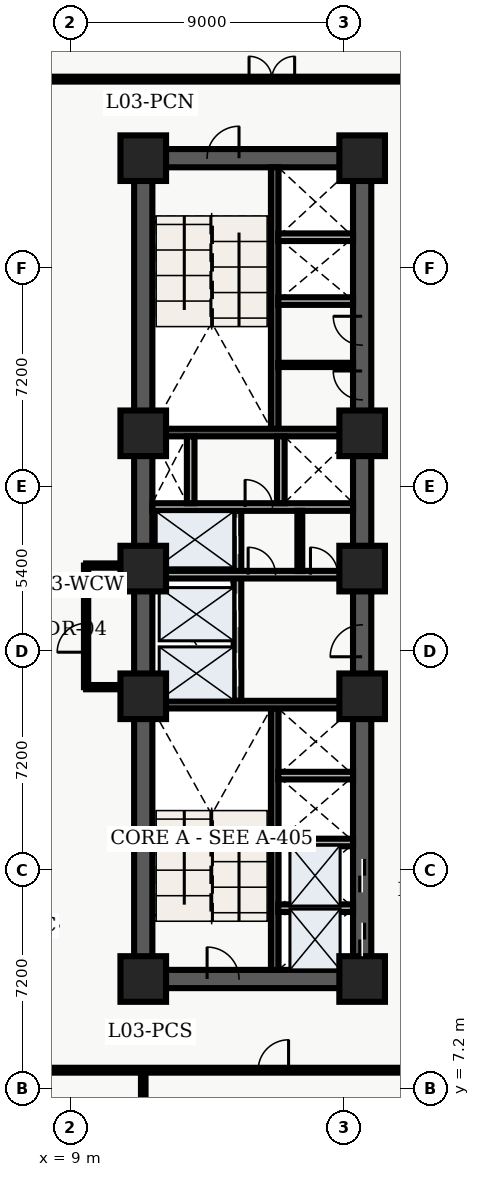
"""IFC4 building model, lengths in metres.
Left out: names, types, materials, properties, quantities, classifications, styles, units other than length and angle.
Written with IfcOpenShell. Run it as: python <this file> out.ifc"""

import sys

from ifc_helpers import new_model, entity, si_unit, converted_unit, direction, frame, origin_with_axes, origin_2d_with_axis, place, context, subcontext, project, spatial, polyline, rectangle, outline, extrude, element, fill, save


model = new_model("IFC4")
c1 = context("Model", 3, precision=1e-05, world=origin_with_axes(), true_north=direction((0.0, 1.0)))
c2 = subcontext(c1, "Body", "Model", "MODEL_VIEW")
j1 = project(units=[si_unit("LENGTHUNIT", "METRE"), converted_unit("PLANEANGLEUNIT", "DEGREE", entity("IfcPlaneAngleMeasure", 0.017), si_unit("PLANEANGLEUNIT", "RADIAN"), dimensions=[0, 0, 0, 0, 0, 0, 0])], contexts=[c1])
p1 = place(None, origin_with_axes())
s1 = spatial("IfcSite", under=j1, at=p1, CompositionType="ELEMENT")
p2 = place(p1, origin_with_axes())
s2 = spatial("IfcBuilding", under=s1, at=p2, CompositionType="ELEMENT")
p3 = place(p2, frame((0.0, 0.0, 15.3), z_axis=(0.0, 0.0, 1.0), x_axis=(1.0, 0.0, 0.0)))
s3 = spatial("IfcBuildingStorey", under=s2, at=p3, CompositionType="ELEMENT", Elevation=15.3)
p4 = place(p3, frame((11.4, 10.8, 0.0), z_axis=(0.0, 0.0, 1.0), x_axis=(0.0, 1.0, 0.0)))
e1 = element("IfcWall", 1, at=p4, inside=s3, PredefinedType="SHEAR", context=c2, shape_type="SweptSolid", body=[
    extrude(outline(polyline([(0.0, -0.3), (27.0, -0.3), (27.0, 0.3), (0.0, 0.3), (0.0, -0.3)])), origin_with_axes(), (0.0, 0.0, 1.0), 4.26),
])
p5 = place(p3, frame((11.4, 10.8, 0.0), z_axis=(0.0, 0.0, 1.0), x_axis=(1.0, 0.0, 0.0)))
e2 = element("IfcWall", 2, at=p5, inside=s3, PredefinedType="SHEAR", context=c2, shape_type="SweptSolid", body=[
    extrude(outline(polyline([(0.0, -0.3), (7.2, -0.3), (7.2, 0.3), (0.0, 0.3), (0.0, -0.3)])), origin_with_axes(), (0.0, 0.0, 1.0), 4.26),
])
p6 = place(p5, frame((2.625, 0.0, 0.0), z_axis=(0.0, 0.0, 1.0), x_axis=(1.0, 0.0, 0.0)))
e3 = element("IfcOpeningElement", 3, at=p6, cuts=e2, PredefinedType="OPENING", context=c2, shape_type="SweptSolid", body=[
    extrude(rectangle(XDim=1.05, YDim=0.62, at=origin_2d_with_axis()), origin_with_axes(), (0.0, 0.0, 1.0), 2.15),
])
p7 = place(p3, frame((11.4, 37.8, 0.0), z_axis=(0.0, 0.0, 1.0), x_axis=(1.0, 0.0, 0.0)))
e4 = element("IfcWall", 4, at=p7, inside=s3, PredefinedType="SHEAR", context=c2, shape_type="SweptSolid", body=[
    extrude(outline(polyline([(0.0, -0.3), (7.2, -0.3), (7.2, 0.3), (0.0, 0.3), (0.0, -0.3)])), origin_with_axes(), (0.0, 0.0, 1.0), 4.26),
])
p8 = place(p7, frame((2.625, 0.0, 0.0), z_axis=(0.0, 0.0, 1.0), x_axis=(1.0, 0.0, 0.0)))
e5 = element("IfcOpeningElement", 5, at=p8, cuts=e4, PredefinedType="OPENING", context=c2, shape_type="SweptSolid", body=[
    extrude(rectangle(XDim=1.05, YDim=0.62, at=origin_2d_with_axis()), origin_with_axes(), (0.0, 0.0, 1.0), 2.15),
])
p9 = place(p3, frame((18.6, 10.8, 0.0), z_axis=(0.0, 0.0, 1.0), x_axis=(0.0, 1.0, 0.0)))
e6 = element("IfcWall", 6, at=p9, inside=s3, PredefinedType="SHEAR", context=c2, shape_type="SweptSolid", body=[
    extrude(outline(polyline([(0.0, -0.3), (13.5, -0.3), (13.5, 0.3), (0.0, 0.3), (0.0, -0.3)])), origin_with_axes(), (0.0, 0.0, 1.0), 4.26),
])
p10 = place(p9, frame((1.3, 0.0, 0.0), z_axis=(0.0, 0.0, 1.0), x_axis=(1.0, 0.0, 0.0)))
e7 = element("IfcOpeningElement", 7, at=p10, cuts=e6, PredefinedType="OPENING", context=c2, shape_type="SweptSolid", body=[
    extrude(rectangle(XDim=1.1, YDim=0.62, at=origin_2d_with_axis()), origin_with_axes(), (0.0, 0.0, 1.0), 2.15),
])
p11 = place(p9, frame((3.4, 0.0, 0.0), z_axis=(0.0, 0.0, 1.0), x_axis=(1.0, 0.0, 0.0)))
e8 = element("IfcOpeningElement", 8, at=p11, cuts=e6, PredefinedType="OPENING", context=c2, shape_type="SweptSolid", body=[
    extrude(rectangle(XDim=1.1, YDim=0.62, at=origin_2d_with_axis()), origin_with_axes(), (0.0, 0.0, 1.0), 2.15),
])
p12 = place(p9, frame((11.125, 0.0, 0.0), z_axis=(0.0, 0.0, 1.0), x_axis=(1.0, 0.0, 0.0)))
e9 = element("IfcOpeningElement", 9, at=p12, cuts=e6, PredefinedType="OPENING", context=c2, shape_type="SweptSolid", body=[
    extrude(rectangle(XDim=1.05, YDim=0.62, at=origin_2d_with_axis()), origin_with_axes(), (0.0, 0.0, 1.0), 2.15),
])
p13 = place(p3, frame((18.6, 24.3, 0.0), z_axis=(0.0, 0.0, 1.0), x_axis=(0.0, 1.0, 0.0)))
e10 = element("IfcWall", 10, at=p13, inside=s3, PredefinedType="SHEAR", context=c2, shape_type="SweptSolid", body=[
    extrude(outline(polyline([(0.0, -0.3), (13.5, -0.3), (13.5, 0.3), (0.0, 0.3), (0.0, -0.3)])), origin_with_axes(), (0.0, 0.0, 1.0), 4.26),
])
p14 = place(p13, frame((6.025, 0.0, 0.0), z_axis=(0.0, 0.0, 1.0), x_axis=(1.0, 0.0, 0.0)))
e11 = element("IfcOpeningElement", 11, at=p14, cuts=e10, PredefinedType="OPENING", context=c2, shape_type="SweptSolid", body=[
    extrude(rectangle(XDim=0.95, YDim=0.62, at=origin_2d_with_axis()), origin_with_axes(), (0.0, 0.0, 1.0), 2.15),
])
p15 = place(p13, frame((7.825, 0.0, 0.0), z_axis=(0.0, 0.0, 1.0), x_axis=(1.0, 0.0, 0.0)))
e12 = element("IfcOpeningElement", 12, at=p15, cuts=e10, PredefinedType="OPENING", context=c2, shape_type="SweptSolid", body=[
    extrude(rectangle(XDim=0.95, YDim=0.62, at=origin_2d_with_axis()), origin_with_axes(), (0.0, 0.0, 1.0), 2.15),
])
p16 = place(p3, frame((15.725, 11.1, 0.0), z_axis=(0.0, 0.0, 1.0), x_axis=(0.0, 1.0, 0.0)))
e13 = element("IfcWall", 13, at=p16, inside=s3, PredefinedType="SHEAR", context=c2, shape_type="SweptSolid", body=[
    extrude(outline(polyline([(0.0, -0.125), (8.6, -0.125), (8.6, 0.125), (0.0, 0.125), (0.0, -0.125)])), origin_with_axes(), (0.0, 0.0, 1.0), 4.26),
])
p17 = place(p3, frame((11.7, 19.825, 0.0), z_axis=(0.0, 0.0, 1.0), x_axis=(1.0, 0.0, 0.0)))
e14 = element("IfcWall", 14, at=p17, inside=s3, PredefinedType="SHEAR", context=c2, shape_type="SweptSolid", body=[
    extrude(outline(polyline([(0.0, -0.125), (6.6, -0.125), (6.6, 0.125), (0.0, 0.125), (0.0, -0.125)])), origin_with_axes(), (0.0, 0.0, 1.0), 4.26),
])
p18 = place(p3, frame((15.725, 28.9, 0.0), z_axis=(0.0, 0.0, 1.0), x_axis=(0.0, 1.0, 0.0)))
e15 = element("IfcWall", 15, at=p18, inside=s3, PredefinedType="SHEAR", context=c2, shape_type="SweptSolid", body=[
    extrude(outline(polyline([(0.0, -0.125), (8.6, -0.125), (8.6, 0.125), (0.0, 0.125), (0.0, -0.125)])), origin_with_axes(), (0.0, 0.0, 1.0), 4.26),
])
p19 = place(p3, frame((11.7, 28.775, 0.0), z_axis=(0.0, 0.0, 1.0), x_axis=(1.0, 0.0, 0.0)))
e16 = element("IfcWall", 16, at=p19, inside=s3, PredefinedType="SHEAR", context=c2, shape_type="SweptSolid", body=[
    extrude(outline(polyline([(0.0, -0.125), (6.6, -0.125), (6.6, 0.125), (0.0, 0.125), (0.0, -0.125)])), origin_with_axes(), (0.0, 0.0, 1.0), 4.26),
])
p20 = place(p3, frame((14.5, 19.95, 0.0), z_axis=(0.0, 0.0, 1.0), x_axis=(0.0, 1.0, 0.0)))
e17 = element("IfcWall", 17, at=p20, inside=s3, PredefinedType="SOLIDWALL", context=c2, shape_type="SweptSolid", body=[
    extrude(outline(polyline([(0.0, -0.125), (6.25, -0.125), (6.25, 0.125), (0.0, 0.125), (0.0, -0.125)])), origin_with_axes(), (0.0, 0.0, 1.0), 3.3),
])
p21 = place(p20, frame((1.025, 0.0, 0.0), z_axis=(0.0, 0.0, 1.0), x_axis=(1.0, 0.0, 0.0)))
e18 = element("IfcOpeningElement", 18, at=p21, cuts=e17, PredefinedType="OPENING", context=c2, shape_type="SweptSolid", body=[
    extrude(rectangle(XDim=1.1, YDim=0.27, at=origin_2d_with_axis()), origin_with_axes(), (0.0, 0.0, 1.0), 2.15),
])
p22 = place(p20, frame((2.975, 0.0, 0.0), z_axis=(0.0, 0.0, 1.0), x_axis=(1.0, 0.0, 0.0)))
e19 = element("IfcOpeningElement", 19, at=p22, cuts=e17, PredefinedType="OPENING", context=c2, shape_type="SweptSolid", body=[
    extrude(rectangle(XDim=1.1, YDim=0.27, at=origin_2d_with_axis()), origin_with_axes(), (0.0, 0.0, 1.0), 2.15),
])
p23 = place(p20, frame((5.425, 0.0, 0.0), z_axis=(0.0, 0.0, 1.0), x_axis=(1.0, 0.0, 0.0)))
e20 = element("IfcOpeningElement", 20, at=p23, cuts=e17, PredefinedType="OPENING", context=c2, shape_type="SweptSolid", body=[
    extrude(rectangle(XDim=1.2, YDim=0.27, at=origin_2d_with_axis()), origin_with_axes(), (0.0, 0.0, 1.0), 2.15),
])
p24 = place(p3, frame((11.7, 24.1, 0.0), z_axis=(0.0, 0.0, 1.0), x_axis=(1.0, 0.0, 0.0)))
e21 = element("IfcWall", 21, at=p24, inside=s3, PredefinedType="SOLIDWALL", context=c2, shape_type="SweptSolid", body=[
    extrude(outline(polyline([(0.0, -0.125), (6.6, -0.125), (6.6, 0.125), (0.0, 0.125), (0.0, -0.125)])), origin_with_axes(), (0.0, 0.0, 1.0), 3.3),
])
p25 = place(p24, frame((3.6, 0.0, 0.0), z_axis=(0.0, 0.0, 1.0), x_axis=(1.0, 0.0, 0.0)))
e22 = element("IfcOpeningElement", 22, at=p25, cuts=e21, PredefinedType="OPENING", context=c2, shape_type="SweptSolid", body=[
    extrude(rectangle(XDim=0.9, YDim=0.27, at=origin_2d_with_axis()), origin_with_axes(), (0.0, 0.0, 1.0), 2.15),
])
p26 = place(p24, frame((5.65, 0.0, 0.0), z_axis=(0.0, 0.0, 1.0), x_axis=(1.0, 0.0, 0.0)))
e23 = element("IfcOpeningElement", 23, at=p26, cuts=e21, PredefinedType="OPENING", context=c2, shape_type="SweptSolid", body=[
    extrude(rectangle(XDim=0.9, YDim=0.27, at=origin_2d_with_axis()), origin_with_axes(), (0.0, 0.0, 1.0), 2.15),
])
p27 = place(p3, frame((11.7, 26.325, 0.0), z_axis=(0.0, 0.0, 1.0), x_axis=(1.0, 0.0, 0.0)))
e24 = element("IfcWall", 24, at=p27, inside=s3, PredefinedType="SOLIDWALL", context=c2, shape_type="SweptSolid", body=[
    extrude(outline(polyline([(0.0, -0.125), (6.6, -0.125), (6.6, 0.125), (0.0, 0.125), (0.0, -0.125)])), origin_with_axes(), (0.0, 0.0, 1.0), 3.3),
])
p28 = place(p27, frame((3.5, 0.0, 0.0), z_axis=(0.0, 0.0, 1.0), x_axis=(1.0, 0.0, 0.0)))
e25 = element("IfcOpeningElement", 25, at=p28, cuts=e24, PredefinedType="OPENING", context=c2, shape_type="SweptSolid", body=[
    extrude(rectangle(XDim=0.9, YDim=0.27, at=origin_2d_with_axis()), origin_with_axes(), (0.0, 0.0, 1.0), 2.15),
])
for number, where, z_axis, x_axis in (
    (26, (12.96, 26.45, 0.0), (0.0, 0.0, 1.0), (0.0, 1.0, 0.0)),
    (27, (15.925, 26.45, 0.0), (0.0, 0.0, 1.0), (0.0, 1.0, 0.0)),
):
    element("IfcWall", number, at=place(p3, frame(where, z_axis=z_axis, x_axis=x_axis)), inside=s3, PredefinedType="SOLIDWALL", context=c2, shape_type="SweptSolid", body=[
        extrude(outline(polyline([(0.0, -0.125), (2.2, -0.125), (2.2, 0.125), (0.0, 0.125), (0.0, -0.125)])), origin_with_axes(), (0.0, 0.0, 1.0), 3.3),
    ])
for number, where, z_axis, x_axis in (
    (28, (11.4, 10.8, 0.0), (0.0, 0.0, 1.0), (1.0, 0.0, 0.0)),
    (29, (11.4, 20.1, 0.0), (0.0, 0.0, 1.0), (1.0, 0.0, 0.0)),
    (30, (11.4, 24.3, 0.0), (0.0, 0.0, 1.0), (1.0, 0.0, 0.0)),
    (31, (11.4, 28.75, 0.0), (0.0, 0.0, 1.0), (1.0, 0.0, 0.0)),
    (32, (11.4, 37.8, 0.0), (0.0, 0.0, 1.0), (1.0, 0.0, 0.0)),
    (33, (18.6, 10.8, 0.0), (0.0, 0.0, 1.0), (1.0, 0.0, 0.0)),
    (34, (18.6, 20.1, 0.0), (0.0, 0.0, 1.0), (1.0, 0.0, 0.0)),
    (35, (18.6, 24.3, 0.0), (0.0, 0.0, 1.0), (1.0, 0.0, 0.0)),
    (36, (18.6, 28.75, 0.0), (0.0, 0.0, 1.0), (1.0, 0.0, 0.0)),
    (37, (18.6, 37.8, 0.0), (0.0, 0.0, 1.0), (1.0, 0.0, 0.0)),
):
    element("IfcColumn", number, at=place(p3, frame(where, z_axis=z_axis, x_axis=x_axis)), inside=s3, PredefinedType="COLUMN", context=c2, shape_type="SweptSolid", body=[
        extrude(rectangle(XDim=1.5, YDim=1.5, at=origin_2d_with_axis()), origin_with_axes(), (0.0, 0.0, 1.0), 4.5),
    ])
p29 = place(p3, frame((16.55, 24.22, 0.0), z_axis=(0.0, 0.0, 1.0), x_axis=(0.0, 1.0, 0.0)))
e38 = element("IfcWall", 38, at=p29, inside=s3, PredefinedType="PARTITIONING", context=c2, shape_type="SweptSolid", body=[
    extrude(outline(polyline([(0.0, -0.08), (1.98, -0.08), (1.98, 0.08), (0.0, 0.08), (0.0, -0.08)])), origin_with_axes(), (0.0, 0.0, 1.0), 3.2),
])
for number, where, z_axis, x_axis in (
    (39, (15.84, 13.13, 0.0), (0.0, 0.0, 1.0), (1.0, 0.0, 0.0)),
    (40, (15.84, 15.29, 0.0), (0.0, 0.0, 1.0), (1.0, 0.0, 0.0)),
    (41, (15.84, 17.49, 0.0), (0.0, 0.0, 1.0), (1.0, 0.0, 0.0)),
    (42, (15.84, 33.1, 0.0), (0.0, 0.0, 1.0), (1.0, 0.0, 0.0)),
    (43, (15.84, 35.2, 0.0), (0.0, 0.0, 1.0), (1.0, 0.0, 0.0)),
):
    element("IfcWall", number, at=place(p3, frame(where, z_axis=z_axis, x_axis=x_axis)), inside=s3, PredefinedType="SOLIDWALL", context=c2, shape_type="SweptSolid", body=[
        extrude(outline(polyline([(0.0, -0.125), (2.46, -0.125), (2.46, 0.125), (0.0, 0.125), (0.0, -0.125)])), origin_with_axes(), (0.0, 0.0, 1.0), 3.2),
    ])
p30 = place(p3, frame((15.84, 31.0, 0.0), z_axis=(0.0, 0.0, 1.0), x_axis=(1.0, 0.0, 0.0)))
e44 = element("IfcWall", 44, at=p30, inside=s3, PredefinedType="PARTITIONING", context=c2, shape_type="SweptSolid", body=[
    extrude(outline(polyline([(0.0, -0.07), (2.46, -0.07), (2.46, 0.07), (0.0, 0.07), (0.0, -0.07)])), origin_with_axes(), (0.0, 0.0, 1.0), 3.2),
])
p31 = place(p3, frame((9.52, 20.4, 0.0), z_axis=(0.0, 0.0, 1.0), x_axis=(0.0, 1.0, 0.0)))
e45 = element("IfcWall", 45, at=p31, inside=s3, PredefinedType="PARTITIONING", context=c2, shape_type="SweptSolid", body=[
    extrude(outline(polyline([(0.0, -0.07), (4.0, -0.07), (4.0, 0.07), (0.0, 0.07), (0.0, -0.07)])), origin_with_axes(), (0.0, 0.0, 1.0), 3.2),
])
p32 = place(p31, frame((1.625, 0.0, 0.0), z_axis=(0.0, 0.0, 1.0), x_axis=(1.0, 0.0, 0.0)))
e46 = element("IfcOpeningElement", 46, at=p32, cuts=e45, PredefinedType="OPENING", context=c2, shape_type="SweptSolid", body=[
    extrude(rectangle(XDim=0.95, YDim=0.16, at=origin_2d_with_axis()), origin_with_axes(), (0.0, 0.0, 1.0), 2.15),
])
for number, where, z_axis, x_axis in (
    (47, (9.52, 20.4, 0.0), (0.0, 0.0, 1.0), (1.0, 0.0, 0.0)),
    (48, (9.52, 24.4, 0.0), (0.0, 0.0, 1.0), (1.0, 0.0, 0.0)),
):
    element("IfcWall", number, at=place(p3, frame(where, z_axis=z_axis, x_axis=x_axis)), inside=s3, PredefinedType="PARTITIONING", context=c2, shape_type="SweptSolid", body=[
        extrude(outline(polyline([(0.0, -0.07), (1.58, -0.07), (1.58, 0.07), (0.0, 0.07), (0.0, -0.07)])), origin_with_axes(), (0.0, 0.0, 1.0), 3.2),
    ])
p33 = place(p3, frame((0.38, 7.8, 0.0), z_axis=(0.0, 0.0, 1.0), x_axis=(1.0, 0.0, 0.0)))
e49 = element("IfcWall", 49, at=p33, inside=s3, PredefinedType="PARTITIONING", context=c2, shape_type="SweptSolid", body=[
    extrude(outline(polyline([(0.0, -0.08), (20.92, -0.08), (20.92, 0.08), (0.0, 0.08), (0.0, -0.08)])), origin_with_axes(), (0.0, 0.0, 1.0), 3.2),
])
p34 = place(p33, frame((3.7, 0.0, 0.0), z_axis=(0.0, 0.0, 1.0), x_axis=(1.0, 0.0, 0.0)))
e50 = element("IfcOpeningElement", 50, at=p34, cuts=e49, PredefinedType="OPENING", context=c2, shape_type="SweptSolid", body=[
    extrude(rectangle(XDim=1.0, YDim=0.18, at=origin_2d_with_axis()), origin_with_axes(), (0.0, 0.0, 1.0), 2.15),
])
p35 = place(p33, frame((15.3, 0.0, 0.0), z_axis=(0.0, 0.0, 1.0), x_axis=(1.0, 0.0, 0.0)))
e51 = element("IfcOpeningElement", 51, at=p35, cuts=e49, PredefinedType="OPENING", context=c2, shape_type="SweptSolid", body=[
    extrude(rectangle(XDim=1.0, YDim=0.18, at=origin_2d_with_axis()), origin_with_axes(), (0.0, 0.0, 1.0), 2.15),
])
p36 = place(p3, frame((11.4, 0.38, 0.0), z_axis=(0.0, 0.0, 1.0), x_axis=(0.0, 1.0, 0.0)))
e52 = element("IfcWall", 52, at=p36, inside=s3, PredefinedType="PARTITIONING", context=c2, shape_type="SweptSolid", body=[
    extrude(outline(polyline([(0.0, -0.075), (7.42, -0.075), (7.42, 0.075), (0.0, 0.075), (0.0, -0.075)])), origin_with_axes(), (0.0, 0.0, 1.0), 3.2),
])
p37 = place(p3, frame((0.38, 40.4, 0.0), z_axis=(0.0, 0.0, 1.0), x_axis=(1.0, 0.0, 0.0)))
e53 = element("IfcWall", 53, at=p37, inside=s3, PredefinedType="PARTITIONING", context=c2, shape_type="SweptSolid", body=[
    extrude(outline(polyline([(0.0, -0.08), (20.92, -0.08), (20.92, 0.08), (0.0, 0.08), (0.0, -0.08)])), origin_with_axes(), (0.0, 0.0, 1.0), 3.2),
])
p38 = place(p37, frame((15.25, 0.0, 0.0), z_axis=(0.0, 0.0, 1.0), x_axis=(1.0, 0.0, 0.0)))
e54 = element("IfcOpeningElement", 54, at=p38, cuts=e53, PredefinedType="OPENING", context=c2, shape_type="SweptSolid", body=[
    extrude(rectangle(XDim=1.5, YDim=0.18, at=origin_2d_with_axis()), origin_with_axes(), (0.0, 0.0, 1.0), 2.2),
])
p39 = place(p9, frame((1.3, 0.0, 0.0), z_axis=(0.0, 0.0, 1.0), x_axis=(1.0, 0.0, 0.0)))
e55 = element("IfcDoor", 55, at=p39, inside=s3, OperationType="SLIDING_TO_LEFT", PredefinedType="DOOR", context=c2, shape_type="SweptSolid", body=[
    extrude(rectangle(XDim=1.1, YDim=0.09, at=origin_2d_with_axis()), origin_with_axes(), (0.0, 0.0, 1.0), 2.15),
])
fill(e7, e55)
p40 = place(p9, frame((3.4, 0.0, 0.0), z_axis=(0.0, 0.0, 1.0), x_axis=(1.0, 0.0, 0.0)))
e56 = element("IfcDoor", 56, at=p40, inside=s3, OperationType="SLIDING_TO_RIGHT", PredefinedType="DOOR", context=c2, shape_type="SweptSolid", body=[
    extrude(rectangle(XDim=1.1, YDim=0.09, at=origin_2d_with_axis()), origin_with_axes(), (0.0, 0.0, 1.0), 2.15),
])
fill(e8, e56)
p41 = place(p20, frame((1.025, 0.0, 0.0), z_axis=(0.0, 0.0, 1.0), x_axis=(1.0, 0.0, 0.0)))
e57 = element("IfcDoor", 57, at=p41, inside=s3, OperationType="SLIDING_TO_LEFT", PredefinedType="DOOR", context=c2, shape_type="SweptSolid", body=[
    extrude(rectangle(XDim=1.1, YDim=0.09, at=origin_2d_with_axis()), origin_with_axes(), (0.0, 0.0, 1.0), 2.15),
])
fill(e18, e57)
p42 = place(p20, frame((2.975, 0.0, 0.0), z_axis=(0.0, 0.0, 1.0), x_axis=(1.0, 0.0, 0.0)))
e58 = element("IfcDoor", 58, at=p42, inside=s3, OperationType="SLIDING_TO_RIGHT", PredefinedType="DOOR", context=c2, shape_type="SweptSolid", body=[
    extrude(rectangle(XDim=1.1, YDim=0.09, at=origin_2d_with_axis()), origin_with_axes(), (0.0, 0.0, 1.0), 2.15),
])
fill(e19, e58)
p43 = place(p20, frame((5.425, 0.0, 0.0), z_axis=(0.0, 0.0, 1.0), x_axis=(1.0, 0.0, 0.0)))
e59 = element("IfcDoor", 59, at=p43, inside=s3, OperationType="DOUBLE_DOOR_SLIDING", PredefinedType="DOOR", context=c2, shape_type="SweptSolid", body=[
    extrude(rectangle(XDim=1.2, YDim=0.09, at=origin_2d_with_axis()), origin_with_axes(), (0.0, 0.0, 1.0), 2.15),
])
fill(e20, e59)
p44 = place(p5, frame((2.625, 0.0, 0.0), z_axis=(0.0, 0.0, 1.0), x_axis=(1.0, 0.0, 0.0)))
e60 = element("IfcDoor", 60, at=p44, inside=s3, OperationType="SINGLE_SWING_LEFT", PredefinedType="DOOR", context=c2, shape_type="SweptSolid", body=[
    extrude(rectangle(XDim=1.05, YDim=0.09, at=origin_2d_with_axis()), origin_with_axes(), (0.0, 0.0, 1.0), 2.15),
])
fill(e3, e60)
p45 = place(p7, frame((2.625, 0.0, 0.0), z_axis=(0.0, 0.0, 1.0), x_axis=(1.0, 0.0, 0.0)))
e61 = element("IfcDoor", 61, at=p45, inside=s3, OperationType="SINGLE_SWING_RIGHT", PredefinedType="DOOR", context=c2, shape_type="SweptSolid", body=[
    extrude(rectangle(XDim=1.05, YDim=0.09, at=origin_2d_with_axis()), origin_with_axes(), (0.0, 0.0, 1.0), 2.15),
])
fill(e5, e61)
p46 = place(p9, frame((11.125, 0.0, 0.0), z_axis=(0.0, 0.0, 1.0), x_axis=(1.0, 0.0, 0.0)))
e62 = element("IfcDoor", 62, at=p46, inside=s3, OperationType="SINGLE_SWING_LEFT", PredefinedType="DOOR", context=c2, shape_type="SweptSolid", body=[
    extrude(rectangle(XDim=1.05, YDim=0.09, at=origin_2d_with_axis()), origin_with_axes(), (0.0, 0.0, 1.0), 2.15),
])
fill(e9, e62)
p47 = place(p24, frame((3.6, 0.0, 0.0), z_axis=(0.0, 0.0, 1.0), x_axis=(1.0, 0.0, 0.0)))
e63 = element("IfcDoor", 63, at=p47, inside=s3, OperationType="SINGLE_SWING_LEFT", PredefinedType="DOOR", context=c2, shape_type="SweptSolid", body=[
    extrude(rectangle(XDim=0.9, YDim=0.09, at=origin_2d_with_axis()), origin_with_axes(), (0.0, 0.0, 1.0), 2.15),
])
fill(e22, e63)
p48 = place(p24, frame((5.65, 0.0, 0.0), z_axis=(0.0, 0.0, 1.0), x_axis=(1.0, 0.0, 0.0)))
e64 = element("IfcDoor", 64, at=p48, inside=s3, OperationType="SINGLE_SWING_LEFT", PredefinedType="DOOR", context=c2, shape_type="SweptSolid", body=[
    extrude(rectangle(XDim=0.9, YDim=0.09, at=origin_2d_with_axis()), origin_with_axes(), (0.0, 0.0, 1.0), 2.15),
])
fill(e23, e64)
p49 = place(p27, frame((3.5, 0.0, 0.0), z_axis=(0.0, 0.0, 1.0), x_axis=(1.0, 0.0, 0.0)))
e65 = element("IfcDoor", 65, at=p49, inside=s3, OperationType="SINGLE_SWING_LEFT", PredefinedType="DOOR", context=c2, shape_type="SweptSolid", body=[
    extrude(rectangle(XDim=0.9, YDim=0.09, at=origin_2d_with_axis()), origin_with_axes(), (0.0, 0.0, 1.0), 2.15),
])
fill(e25, e65)
p50 = place(p13, frame((6.025, 0.0, 0.0), z_axis=(0.0, 0.0, 1.0), x_axis=(1.0, 0.0, 0.0)))
e66 = element("IfcDoor", 66, at=p50, inside=s3, OperationType="SINGLE_SWING_RIGHT", PredefinedType="DOOR", context=c2, shape_type="SweptSolid", body=[
    extrude(rectangle(XDim=0.95, YDim=0.09, at=origin_2d_with_axis()), origin_with_axes(), (0.0, 0.0, 1.0), 2.15),
])
fill(e11, e66)
p51 = place(p13, frame((7.825, 0.0, 0.0), z_axis=(0.0, 0.0, 1.0), x_axis=(1.0, 0.0, 0.0)))
e67 = element("IfcDoor", 67, at=p51, inside=s3, OperationType="SINGLE_SWING_RIGHT", PredefinedType="DOOR", context=c2, shape_type="SweptSolid", body=[
    extrude(rectangle(XDim=0.95, YDim=0.09, at=origin_2d_with_axis()), origin_with_axes(), (0.0, 0.0, 1.0), 2.15),
])
fill(e12, e67)
p52 = place(p31, frame((1.625, 0.0, 0.0), z_axis=(0.0, 0.0, 1.0), x_axis=(1.0, 0.0, 0.0)))
e68 = element("IfcDoor", 68, at=p52, inside=s3, OperationType="SINGLE_SWING_LEFT", PredefinedType="DOOR", context=c2, shape_type="SweptSolid", body=[
    extrude(rectangle(XDim=0.95, YDim=0.084, at=origin_2d_with_axis()), origin_with_axes(), (0.0, 0.0, 1.0), 2.15),
])
fill(e46, e68)
p53 = place(p33, frame((15.3, 0.0, 0.0), z_axis=(0.0, 0.0, 1.0), x_axis=(1.0, 0.0, 0.0)))
e69 = element("IfcDoor", 69, at=p53, inside=s3, OperationType="SINGLE_SWING_RIGHT", PredefinedType="DOOR", context=c2, shape_type="SweptSolid", body=[
    extrude(rectangle(XDim=1.0, YDim=0.09, at=origin_2d_with_axis()), origin_with_axes(), (0.0, 0.0, 1.0), 2.15),
])
fill(e51, e69)
p54 = place(p37, frame((15.25, 0.0, 0.0), z_axis=(0.0, 0.0, 1.0), x_axis=(1.0, 0.0, 0.0)))
e70 = element("IfcDoor", 70, at=p54, inside=s3, OperationType="DOUBLE_DOOR_SINGLE_SWING", PredefinedType="DOOR", context=c2, shape_type="SweptSolid", body=[
    extrude(rectangle(XDim=1.5, YDim=0.09, at=origin_2d_with_axis()), origin_with_axes(), (0.0, 0.0, 1.0), 2.2),
])
fill(e54, e70)
save(model, sys.argv[1])
